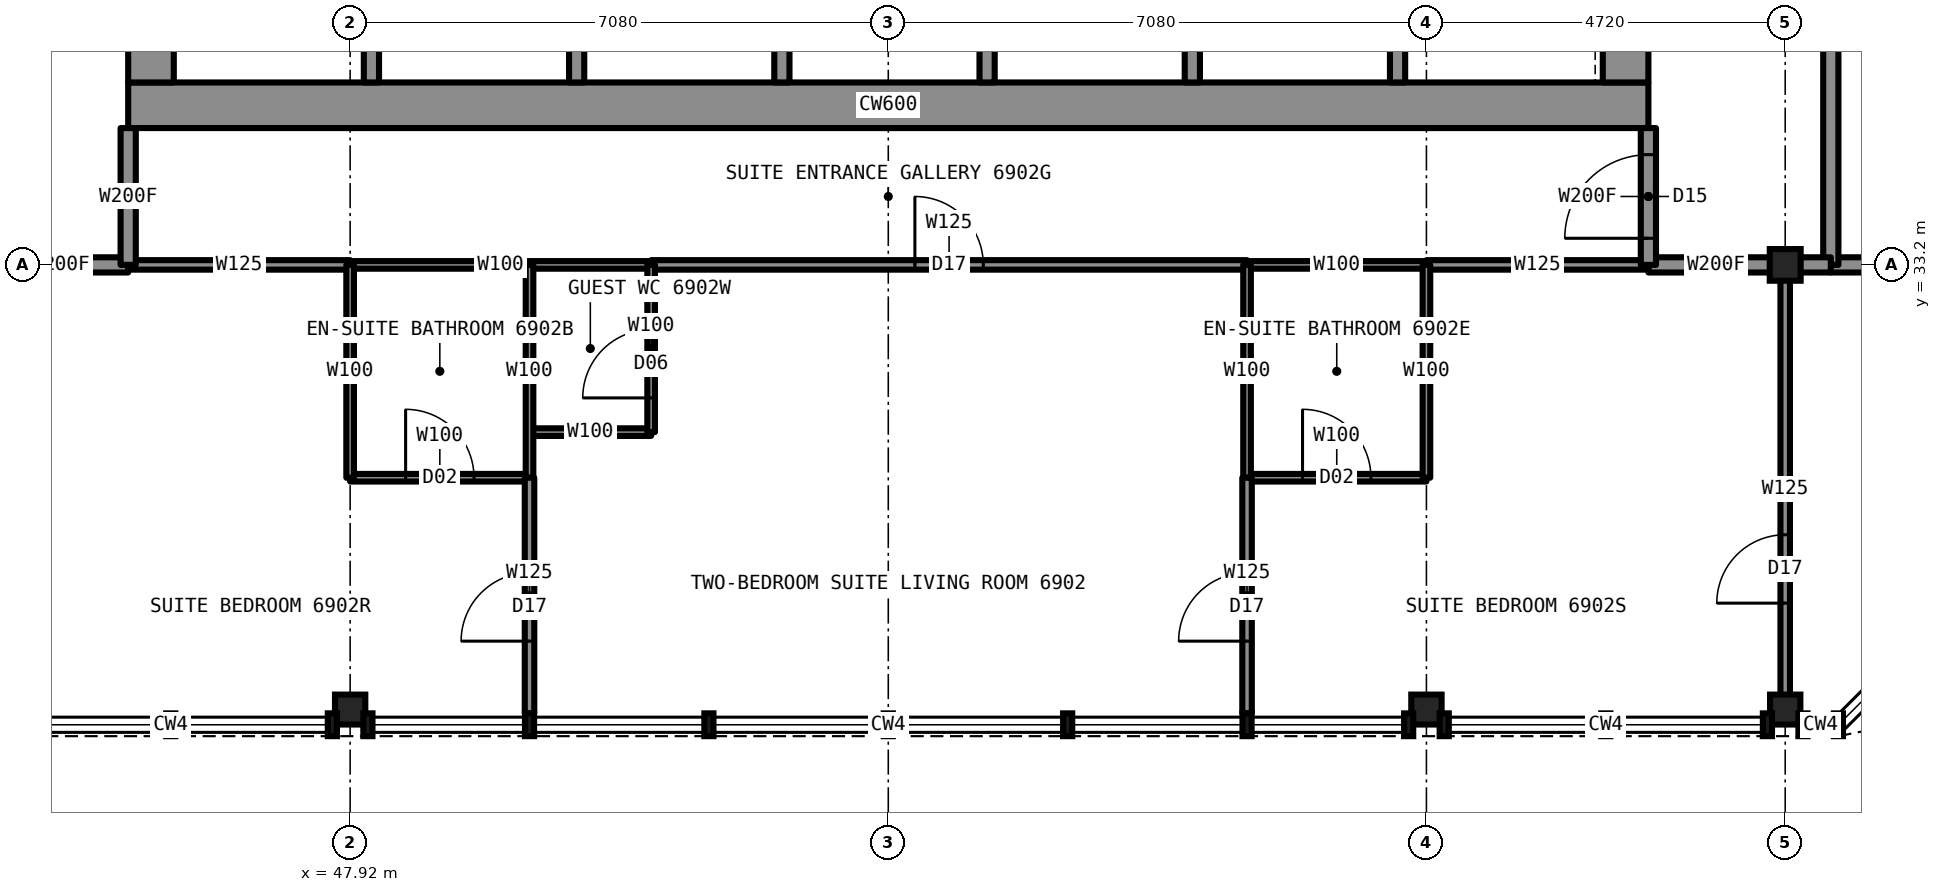
"""IFC4 building model, lengths in metres.
Left out: names, types, materials, properties, quantities, classifications, styles, units other than length and angle.
Written with IfcOpenShell. Run it as: python <this file> out.ifc"""

import sys

from ifc_helpers import new_model, si_unit, direction, frame, frame_2d, origin, origin_2d, place, context, subcontext, project, spatial, rectangle, i_section, extrude, element, fill, save


model = new_model("IFC4")
c1 = context("Model", 3, precision=1e-05, world=origin(), true_north=direction((0.0, 1.0)))
c2 = subcontext(c1, "Body", "Model", "MODEL_VIEW")
j1 = project(units=[si_unit("LENGTHUNIT", "METRE"), si_unit("PLANEANGLEUNIT", "RADIAN")], contexts=[c1])
p1 = place(None, origin())
s1 = spatial("IfcSite", under=j1, at=p1, CompositionType="ELEMENT")
p2 = place(p1, origin())
s2 = spatial("IfcBuilding", under=s1, at=p2, CompositionType="ELEMENT")
p3 = place(p2, frame((0.0, 0.0, 254.7)))
s3 = spatial("IfcBuildingStorey", under=s2, at=p3, CompositionType="ELEMENT", Elevation=254.7)
for number, where, z_axis, x_axis in (
    (1, (47.92, 27.35, 0.0), (0.0, 0.0, 1.0), (1.0, 0.0, 0.0)),
    (2, (62.08, 27.35, 0.0), (0.0, 0.0, 1.0), (1.0, 0.0, 0.0)),
    (3, (66.8, 27.35, 0.0), (0.0, 0.0, 1.0), (1.0, 0.0, 0.0)),
):
    element("IfcColumn", number, at=place(p3, frame(where, z_axis=z_axis, x_axis=x_axis)), inside=s3, PredefinedType="COLUMN", context=c2, shape_type="SweptSolid", body=[
        extrude(i_section(OverallWidth=0.399, OverallDepth=0.394, WebThickness=0.023, FlangeThickness=0.037, at=origin_2d()), origin(), (0.0, 0.0, 1.0), 3.5),
    ])
p4 = place(p3, frame((66.8, 33.2, 0.0), z_axis=(0.0, 0.0, 1.0), x_axis=(1.0, 0.0, 0.0)))
e4 = element("IfcColumn", 4, at=p4, inside=s3, PredefinedType="COLUMN", context=c2, shape_type="SweptSolid", body=[
    extrude(i_section(OverallWidth=0.406, OverallDepth=0.417, WebThickness=0.03, FlangeThickness=0.048, at=origin_2d()), origin(), (0.0, 0.0, 1.0), 3.5),
])
p5 = place(p3, frame((45.0, 35.3, 0.0), z_axis=(0.0, 0.0, 1.0), x_axis=(1.0, 0.0, 0.0)))
e5 = element("IfcWall", 5, at=p5, inside=s3, PredefinedType="SHEAR", context=c2, shape_type="SweptSolid", body=[
    extrude(rectangle(XDim=20.0, YDim=0.6, at=frame_2d((10.0, 0.0))), origin(), (0.0, 0.0, 1.0), 3.5),
])
p6 = place(p3, frame((64.7, 35.6, 0.0), z_axis=(0.0, 0.0, 1.0), x_axis=(0.0, 1.0, 0.0)))
e6 = element("IfcWall", 6, at=p6, inside=s3, PredefinedType="SHEAR", context=c2, shape_type="SweptSolid", body=[
    extrude(rectangle(XDim=18.8, YDim=0.6, at=frame_2d((9.4, 0.0))), origin(), (0.0, 0.0, 1.0), 3.5),
])
p7 = place(p6, frame((13.4, 0.0, 0.0)))
e7 = element("IfcOpeningElement", 7, at=p7, cuts=e6, PredefinedType="OPENING", context=c2, shape_type="SweptSolid", body=[
    extrude(rectangle(XDim=1.8, YDim=2.2, at=frame_2d((0.9, 1.1))), frame((0.0, 0.31, 0.0), z_axis=(0.0, -1.0, 0.0), x_axis=(1.0, 0.0, 0.0)), (0.0, 0.0, 1.0), 0.62),
])
p8 = place(p6, frame((3.6, 0.0, 0.0)))
e8 = element("IfcOpeningElement", 8, at=p8, cuts=e6, PredefinedType="OPENING", context=c2, shape_type="SweptSolid", body=[
    extrude(rectangle(XDim=1.8, YDim=2.2, at=frame_2d((0.9, 1.1))), frame((0.0, 0.31, 0.0), z_axis=(0.0, -1.0, 0.0), x_axis=(1.0, 0.0, 0.0)), (0.0, 0.0, 1.0), 0.62),
])
p9 = place(p3, frame((45.3, 35.6, 0.0), z_axis=(0.0, 0.0, 1.0), x_axis=(0.0, 1.0, 0.0)))
e9 = element("IfcWall", 9, at=p9, inside=s3, PredefinedType="SHEAR", context=c2, shape_type="SweptSolid", body=[
    extrude(rectangle(XDim=18.8, YDim=0.6, at=frame_2d((9.4, 0.0))), origin(), (0.0, 0.0, 1.0), 3.5),
])
p10 = place(p9, frame((13.4, 0.0, 0.0)))
e10 = element("IfcOpeningElement", 10, at=p10, cuts=e9, PredefinedType="OPENING", context=c2, shape_type="SweptSolid", body=[
    extrude(rectangle(XDim=1.8, YDim=2.2, at=frame_2d((0.9, 1.1))), frame((0.0, 0.31, 0.0), z_axis=(0.0, -1.0, 0.0), x_axis=(1.0, 0.0, 0.0)), (0.0, 0.0, 1.0), 0.62),
])
p11 = place(p9, frame((3.6, 0.0, 0.0)))
e11 = element("IfcOpeningElement", 11, at=p11, cuts=e9, PredefinedType="OPENING", context=c2, shape_type="SweptSolid", body=[
    extrude(rectangle(XDim=1.8, YDim=2.2, at=frame_2d((0.9, 1.1))), frame((0.0, 0.31, 0.0), z_axis=(0.0, -1.0, 0.0), x_axis=(1.0, 0.0, 0.0)), (0.0, 0.0, 1.0), 0.62),
])
p12 = place(p9, frame((6.4, 0.0, 0.0)))
e12 = element("IfcOpeningElement", 12, at=p12, cuts=e9, PredefinedType="OPENING", context=c2, shape_type="SweptSolid", body=[
    extrude(rectangle(XDim=1.2, YDim=2.2, at=frame_2d((0.6, 1.1))), frame((0.0, 0.31, 0.0), z_axis=(0.0, -1.0, 0.0), x_axis=(1.0, 0.0, 0.0)), (0.0, 0.0, 1.0), 0.62),
])
p13 = place(p3, frame((47.92, 33.2, 0.0), z_axis=(0.0, 0.0, 1.0), x_axis=(1.0, 0.0, 0.0)))
e13 = element("IfcWall", 13, at=p13, inside=s3, PredefinedType="PARTITIONING", context=c2, shape_type="SweptSolid", body=[
    extrude(rectangle(XDim=3.96, YDim=0.1, at=frame_2d((1.98, 0.0))), origin(), (0.0, 0.0, 1.0), 3.33),
])
p14 = place(p3, frame((59.72, 33.2, 0.0), z_axis=(0.0, 0.0, 1.0), x_axis=(1.0, 0.0, 0.0)))
e14 = element("IfcWall", 14, at=p14, inside=s3, PredefinedType="PARTITIONING", context=c2, shape_type="SweptSolid", body=[
    extrude(rectangle(XDim=2.36, YDim=0.1, at=frame_2d((1.18, 0.0))), origin(), (0.0, 0.0, 1.0), 3.33),
])
for number, where, z_axis, x_axis in (
    (15, (43.22, 33.2, 0.0), (0.0, 0.0, 1.0), (1.0, 0.0, 0.0)),
    (16, (65.0, 33.2, 0.0), (0.0, 0.0, 1.0), (1.0, 0.0, 0.0)),
):
    element("IfcWall", number, at=place(p3, frame(where, z_axis=z_axis, x_axis=x_axis)), inside=s3, PredefinedType="PARTITIONING", context=c2, shape_type="SweptSolid", body=[
        extrude(rectangle(XDim=1.78, YDim=0.2, at=frame_2d((0.89, 0.0))), origin(), (0.0, 0.0, 1.0), 3.33),
    ])
p15 = place(p3, frame((67.4, 33.2, 0.0), z_axis=(0.0, 0.0, 1.0), x_axis=(1.0, 0.0, 0.0)))
e17 = element("IfcWall", 17, at=p15, inside=s3, PredefinedType="PARTITIONING", context=c2, shape_type="SweptSolid", body=[
    extrude(rectangle(XDim=5.3, YDim=0.2, at=frame_2d((2.65, 0.0))), origin(), (0.0, 0.0, 1.0), 2.573),
])
p16 = place(p3, frame((45.0, 33.2, 0.0), z_axis=(0.0, 0.0, 1.0), x_axis=(1.0, 0.0, 0.0)))
e18 = element("IfcWall", 18, at=p16, inside=s3, PredefinedType="PARTITIONING", context=c2, shape_type="SweptSolid", body=[
    extrude(rectangle(XDim=2.92, YDim=0.125, at=frame_2d((1.46, 0.0))), origin(), (0.0, 0.0, 1.0), 3.33),
])
p17 = place(p3, frame((51.88, 33.2, 0.0), z_axis=(0.0, 0.0, 1.0), x_axis=(1.0, 0.0, 0.0)))
e19 = element("IfcWall", 19, at=p17, inside=s3, PredefinedType="PARTITIONING", context=c2, shape_type="SweptSolid", body=[
    extrude(rectangle(XDim=7.84, YDim=0.125, at=frame_2d((3.92, 0.0))), origin(), (0.0, 0.0, 1.0), 3.33),
])
p18 = place(p17, frame((3.47, 0.0, 0.0)))
e20 = element("IfcOpeningElement", 20, at=p18, cuts=e19, PredefinedType="OPENING", context=c2, shape_type="SweptSolid", body=[
    extrude(rectangle(XDim=0.9, YDim=2.2, at=frame_2d((0.45, 1.1))), frame((0.0, 0.073, 0.0), z_axis=(0.0, -1.0, 0.0), x_axis=(1.0, 0.0, 0.0)), (0.0, 0.0, 1.0), 0.145),
])
p19 = place(p3, frame((62.08, 33.2, 0.0), z_axis=(0.0, 0.0, 1.0), x_axis=(1.0, 0.0, 0.0)))
e21 = element("IfcWall", 21, at=p19, inside=s3, PredefinedType="PARTITIONING", context=c2, shape_type="SweptSolid", body=[
    extrude(rectangle(XDim=2.92, YDim=0.125, at=frame_2d((1.46, 0.0))), origin(), (0.0, 0.0, 1.0), 3.33),
])
p20 = place(p3, frame((50.28, 31.0, 0.0), z_axis=(0.0, 0.0, 1.0), x_axis=(1.0, 0.0, 0.0)))
e22 = element("IfcWall", 22, at=p20, inside=s3, PredefinedType="PARTITIONING", context=c2, shape_type="SweptSolid", body=[
    extrude(rectangle(XDim=1.6, YDim=0.1, at=frame_2d((0.8, 0.0))), origin(), (0.0, 0.0, 1.0), 3.33),
])
p21 = place(p3, frame((47.92, 30.4, 0.0), z_axis=(0.0, 0.0, 1.0), x_axis=(1.0, 0.0, 0.0)))
e23 = element("IfcWall", 23, at=p21, inside=s3, PredefinedType="PARTITIONING", context=c2, shape_type="SweptSolid", body=[
    extrude(rectangle(XDim=2.36, YDim=0.1, at=frame_2d((1.18, 0.0))), origin(), (0.0, 0.0, 1.0), 3.33),
])
p22 = place(p21, frame((0.73, 0.0, 0.0)))
e24 = element("IfcOpeningElement", 24, at=p22, cuts=e23, PredefinedType="OPENING", context=c2, shape_type="SweptSolid", body=[
    extrude(rectangle(XDim=0.9, YDim=2.1, at=frame_2d((0.45, 1.05))), frame((0.0, 0.06, 0.0), z_axis=(0.0, -1.0, 0.0), x_axis=(1.0, 0.0, 0.0)), (0.0, 0.0, 1.0), 0.12),
])
p23 = place(p3, frame((59.72, 30.4, 0.0), z_axis=(0.0, 0.0, 1.0), x_axis=(1.0, 0.0, 0.0)))
e25 = element("IfcWall", 25, at=p23, inside=s3, PredefinedType="PARTITIONING", context=c2, shape_type="SweptSolid", body=[
    extrude(rectangle(XDim=2.36, YDim=0.1, at=frame_2d((1.18, 0.0))), origin(), (0.0, 0.0, 1.0), 3.33),
])
p24 = place(p23, frame((0.73, 0.0, 0.0)))
e26 = element("IfcOpeningElement", 26, at=p24, cuts=e25, PredefinedType="OPENING", context=c2, shape_type="SweptSolid", body=[
    extrude(rectangle(XDim=0.9, YDim=2.1, at=frame_2d((0.45, 1.05))), frame((0.0, 0.06, 0.0), z_axis=(0.0, -1.0, 0.0), x_axis=(1.0, 0.0, 0.0)), (0.0, 0.0, 1.0), 0.12),
])
p25 = place(p3, frame((45.0, 33.2, 0.0), z_axis=(0.0, 0.0, 1.0), x_axis=(0.0, 1.0, 0.0)))
e27 = element("IfcWall", 27, at=p25, inside=s3, PredefinedType="PARTITIONING", context=c2, shape_type="SweptSolid", body=[
    extrude(rectangle(XDim=1.8, YDim=0.2, at=frame_2d((0.9, 0.0))), origin(), (0.0, 0.0, 1.0), 3.33),
])
p26 = place(p3, frame((51.88, 31.0, 0.0), z_axis=(0.0, 0.0, 1.0), x_axis=(0.0, 1.0, 0.0)))
e28 = element("IfcWall", 28, at=p26, inside=s3, PredefinedType="PARTITIONING", context=c2, shape_type="SweptSolid", body=[
    extrude(rectangle(XDim=2.2, YDim=0.1, at=frame_2d((1.1, 0.0))), origin(), (0.0, 0.0, 1.0), 3.33),
])
p27 = place(p26, frame((0.45, 0.0, 0.0)))
e29 = element("IfcOpeningElement", 29, at=p27, cuts=e28, PredefinedType="OPENING", context=c2, shape_type="SweptSolid", body=[
    extrude(rectangle(XDim=0.9, YDim=2.1, at=frame_2d((0.45, 1.05))), frame((0.0, 0.06, 0.0), z_axis=(0.0, -1.0, 0.0), x_axis=(1.0, 0.0, 0.0)), (0.0, 0.0, 1.0), 0.12),
])
p28 = place(p3, frame((50.28, 30.4, 0.0), z_axis=(0.0, 0.0, 1.0), x_axis=(0.0, 1.0, 0.0)))
e30 = element("IfcWall", 30, at=p28, inside=s3, PredefinedType="PARTITIONING", context=c2, shape_type="SweptSolid", body=[
    extrude(rectangle(XDim=2.8, YDim=0.1, at=frame_2d((1.4, 0.0))), origin(), (0.0, 0.0, 1.0), 3.33),
])
p29 = place(p3, frame((50.28, 27.3, 0.0), z_axis=(0.0, 0.0, 1.0), x_axis=(0.0, 1.0, 0.0)))
e31 = element("IfcWall", 31, at=p29, inside=s3, PredefinedType="PARTITIONING", context=c2, shape_type="SweptSolid", body=[
    extrude(rectangle(XDim=3.1, YDim=0.125, at=frame_2d((1.55, 0.0))), origin(), (0.0, 0.0, 1.0), 3.33),
])
p30 = place(p29, frame((0.95, 0.0, 0.0)))
e32 = element("IfcOpeningElement", 32, at=p30, cuts=e31, PredefinedType="OPENING", context=c2, shape_type="SweptSolid", body=[
    extrude(rectangle(XDim=0.9, YDim=2.2, at=frame_2d((0.45, 1.1))), frame((0.0, 0.073, 0.0), z_axis=(0.0, -1.0, 0.0), x_axis=(1.0, 0.0, 0.0)), (0.0, 0.0, 1.0), 0.145),
])
p31 = place(p3, frame((47.92, 30.4, 0.0), z_axis=(0.0, 0.0, 1.0), x_axis=(0.0, 1.0, 0.0)))
e33 = element("IfcWall", 33, at=p31, inside=s3, PredefinedType="PARTITIONING", context=c2, shape_type="SweptSolid", body=[
    extrude(rectangle(XDim=2.8, YDim=0.1, at=frame_2d((1.4, 0.0))), origin(), (0.0, 0.0, 1.0), 2.573),
])
p32 = place(p3, frame((65.0, 33.2, 0.0), z_axis=(0.0, 0.0, 1.0), x_axis=(0.0, 1.0, 0.0)))
e34 = element("IfcWall", 34, at=p32, inside=s3, PredefinedType="PARTITIONING", context=c2, shape_type="SweptSolid", body=[
    extrude(rectangle(XDim=1.8, YDim=0.2, at=frame_2d((0.9, 0.0))), origin(), (0.0, 0.0, 1.0), 3.33),
])
p33 = place(p32, frame((0.35, 0.0, 0.0)))
e35 = element("IfcOpeningElement", 35, at=p33, cuts=e34, PredefinedType="OPENING", context=c2, shape_type="SweptSolid", body=[
    extrude(rectangle(XDim=1.1, YDim=2.2, at=frame_2d((0.55, 1.1))), frame((0.0, 0.11, 0.0), z_axis=(0.0, -1.0, 0.0), x_axis=(1.0, 0.0, 0.0)), (0.0, 0.0, 1.0), 0.22),
])
p34 = place(p3, frame((66.8, 27.3, 0.0), z_axis=(0.0, 0.0, 1.0), x_axis=(0.0, 1.0, 0.0)))
e36 = element("IfcWall", 36, at=p34, inside=s3, PredefinedType="PARTITIONING", context=c2, shape_type="SweptSolid", body=[
    extrude(rectangle(XDim=5.9, YDim=0.125, at=frame_2d((2.95, 0.0))), origin(), (0.0, 0.0, 1.0), 2.573),
])
p35 = place(p34, frame((1.45, 0.0, 0.0)))
e37 = element("IfcOpeningElement", 37, at=p35, cuts=e36, PredefinedType="OPENING", context=c2, shape_type="SweptSolid", body=[
    extrude(rectangle(XDim=0.9, YDim=2.2, at=frame_2d((0.45, 1.1))), frame((0.0, 0.073, 0.0), z_axis=(0.0, -1.0, 0.0), x_axis=(1.0, 0.0, 0.0)), (0.0, 0.0, 1.0), 0.145),
])
p36 = place(p3, frame((67.4, 33.2, 0.0), z_axis=(0.0, 0.0, 1.0), x_axis=(0.0, 1.0, 0.0)))
e38 = element("IfcWall", 38, at=p36, inside=s3, PredefinedType="PARTITIONING", context=c2, shape_type="SweptSolid", body=[
    extrude(rectangle(XDim=23.6, YDim=0.2, at=frame_2d((11.8, 0.0))), origin(), (0.0, 0.0, 1.0), 3.33),
])
p37 = place(p36, frame((8.95, 0.0, 0.0)))
e39 = element("IfcOpeningElement", 39, at=p37, cuts=e38, PredefinedType="OPENING", context=c2, shape_type="SweptSolid", body=[
    extrude(rectangle(XDim=1.1, YDim=2.2, at=frame_2d((0.55, 1.1))), frame((0.0, 0.11, 0.0), z_axis=(0.0, -1.0, 0.0), x_axis=(1.0, 0.0, 0.0)), (0.0, 0.0, 1.0), 0.22),
])
p38 = place(p3, frame((59.72, 30.4, 0.0), z_axis=(0.0, 0.0, 1.0), x_axis=(0.0, 1.0, 0.0)))
e40 = element("IfcWall", 40, at=p38, inside=s3, PredefinedType="PARTITIONING", context=c2, shape_type="SweptSolid", body=[
    extrude(rectangle(XDim=2.8, YDim=0.1, at=frame_2d((1.4, 0.0))), origin(), (0.0, 0.0, 1.0), 3.33),
])
p39 = place(p3, frame((59.72, 27.3, 0.0), z_axis=(0.0, 0.0, 1.0), x_axis=(0.0, 1.0, 0.0)))
e41 = element("IfcWall", 41, at=p39, inside=s3, PredefinedType="PARTITIONING", context=c2, shape_type="SweptSolid", body=[
    extrude(rectangle(XDim=3.1, YDim=0.125, at=frame_2d((1.55, 0.0))), origin(), (0.0, 0.0, 1.0), 3.33),
])
p40 = place(p39, frame((0.95, 0.0, 0.0)))
e42 = element("IfcOpeningElement", 42, at=p40, cuts=e41, PredefinedType="OPENING", context=c2, shape_type="SweptSolid", body=[
    extrude(rectangle(XDim=0.9, YDim=2.2, at=frame_2d((0.45, 1.1))), frame((0.0, 0.073, 0.0), z_axis=(0.0, -1.0, 0.0), x_axis=(1.0, 0.0, 0.0)), (0.0, 0.0, 1.0), 0.145),
])
p41 = place(p3, frame((62.08, 30.4, 0.0), z_axis=(0.0, 0.0, 1.0), x_axis=(0.0, 1.0, 0.0)))
e43 = element("IfcWall", 43, at=p41, inside=s3, PredefinedType="PARTITIONING", context=c2, shape_type="SweptSolid", body=[
    extrude(rectangle(XDim=2.8, YDim=0.1, at=frame_2d((1.4, 0.0))), origin(), (0.0, 0.0, 1.0), 2.573),
])
for number, where, z_axis, x_axis in (
    (44, (48.2, 35.6, 0.0), (0.0, 0.0, 1.0), (0.0, 1.0, 0.0)),
    (45, (50.9, 35.6, 0.0), (0.0, 0.0, 1.0), (0.0, 1.0, 0.0)),
    (46, (53.6, 35.6, 0.0), (0.0, 0.0, 1.0), (0.0, 1.0, 0.0)),
    (47, (56.3, 35.6, 0.0), (0.0, 0.0, 1.0), (0.0, 1.0, 0.0)),
    (48, (59.0, 35.6, 0.0), (0.0, 0.0, 1.0), (0.0, 1.0, 0.0)),
    (49, (61.7, 35.6, 0.0), (0.0, 0.0, 1.0), (0.0, 1.0, 0.0)),
):
    element("IfcWall", number, at=place(p3, frame(where, z_axis=z_axis, x_axis=x_axis)), inside=s3, PredefinedType="PARTITIONING", context=c2, shape_type="SweptSolid", body=[
        extrude(rectangle(XDim=2.7, YDim=0.2, at=frame_2d((1.35, 0.0))), origin(), (0.0, 0.0, 1.0), 3.33),
    ])
p42 = place(p3, frame((66.78, 33.2, 0.0), z_axis=(0.0, 0.0, 1.0), x_axis=(1.0, 0.0, 0.0)))
e50 = element("IfcWall", 50, at=p42, inside=s3, PredefinedType="PARTITIONING", context=c2, shape_type="SweptSolid", body=[
    extrude(rectangle(XDim=0.62, YDim=0.2, at=frame_2d((0.31, 0.0))), origin(), (0.0, 0.0, 1.0), 2.573),
])
p43 = place(p18, origin())
e51 = element("IfcDoor", 51, at=p43, inside=s3, OperationType="SINGLE_SWING_LEFT", PredefinedType="DOOR", context=c2, shape_type="SweptSolid", body=[
    extrude(rectangle(XDim=0.9, YDim=2.2, at=frame_2d((0.45, 1.1))), frame((0.0, 0.025, 0.0), z_axis=(0.0, -1.0, 0.0), x_axis=(1.0, 0.0, 0.0)), (0.0, 0.0, 1.0), 0.05),
])
fill(e20, e51)
p44 = place(p22, origin())
e52 = element("IfcDoor", 52, at=p44, inside=s3, OperationType="SINGLE_SWING_RIGHT", PredefinedType="DOOR", context=c2, shape_type="SweptSolid", body=[
    extrude(rectangle(XDim=0.9, YDim=2.1, at=frame_2d((0.45, 1.05))), frame((0.0, 0.025, 0.0), z_axis=(0.0, -1.0, 0.0), x_axis=(1.0, 0.0, 0.0)), (0.0, 0.0, 1.0), 0.05),
])
fill(e24, e52)
p45 = place(p24, origin())
e53 = element("IfcDoor", 53, at=p45, inside=s3, OperationType="SINGLE_SWING_RIGHT", PredefinedType="DOOR", context=c2, shape_type="SweptSolid", body=[
    extrude(rectangle(XDim=0.9, YDim=2.1, at=frame_2d((0.45, 1.05))), frame((0.0, 0.025, 0.0), z_axis=(0.0, -1.0, 0.0), x_axis=(1.0, 0.0, 0.0)), (0.0, 0.0, 1.0), 0.05),
])
fill(e26, e53)
p46 = place(p33, origin())
e54 = element("IfcDoor", 54, at=p46, inside=s3, OperationType="SINGLE_SWING_LEFT", PredefinedType="DOOR", context=c2, shape_type="SweptSolid", body=[
    extrude(rectangle(XDim=1.1, YDim=2.2, at=frame_2d((0.55, 1.1))), frame((0.0, 0.025, 0.0), z_axis=(0.0, -1.0, 0.0), x_axis=(1.0, 0.0, 0.0)), (0.0, 0.0, 1.0), 0.05),
])
fill(e35, e54)
p47 = place(p30, origin())
e55 = element("IfcDoor", 55, at=p47, inside=s3, OperationType="SINGLE_SWING_LEFT", PredefinedType="DOOR", context=c2, shape_type="SweptSolid", body=[
    extrude(rectangle(XDim=0.9, YDim=2.2, at=frame_2d((0.45, 1.1))), frame((0.0, 0.025, 0.0), z_axis=(0.0, -1.0, 0.0), x_axis=(1.0, 0.0, 0.0)), (0.0, 0.0, 1.0), 0.05),
])
fill(e32, e55)
p48 = place(p40, origin())
e56 = element("IfcDoor", 56, at=p48, inside=s3, OperationType="SINGLE_SWING_LEFT", PredefinedType="DOOR", context=c2, shape_type="SweptSolid", body=[
    extrude(rectangle(XDim=0.9, YDim=2.2, at=frame_2d((0.45, 1.1))), frame((0.0, 0.025, 0.0), z_axis=(0.0, -1.0, 0.0), x_axis=(1.0, 0.0, 0.0)), (0.0, 0.0, 1.0), 0.05),
])
fill(e42, e56)
p49 = place(p35, origin())
e57 = element("IfcDoor", 57, at=p49, inside=s3, OperationType="SINGLE_SWING_LEFT", PredefinedType="DOOR", context=c2, shape_type="SweptSolid", body=[
    extrude(rectangle(XDim=0.9, YDim=2.2, at=frame_2d((0.45, 1.1))), frame((0.0, 0.025, 0.0), z_axis=(0.0, -1.0, 0.0), x_axis=(1.0, 0.0, 0.0)), (0.0, 0.0, 1.0), 0.05),
])
fill(e37, e57)
p50 = place(p27, origin())
e58 = element("IfcDoor", 58, at=p50, inside=s3, OperationType="SINGLE_SWING_LEFT", PredefinedType="DOOR", context=c2, shape_type="SweptSolid", body=[
    extrude(rectangle(XDim=0.9, YDim=2.1, at=frame_2d((0.45, 1.05))), frame((0.0, 0.025, 0.0), z_axis=(0.0, -1.0, 0.0), x_axis=(1.0, 0.0, 0.0)), (0.0, 0.0, 1.0), 0.05),
])
fill(e29, e58)
save(model, sys.argv[1])
